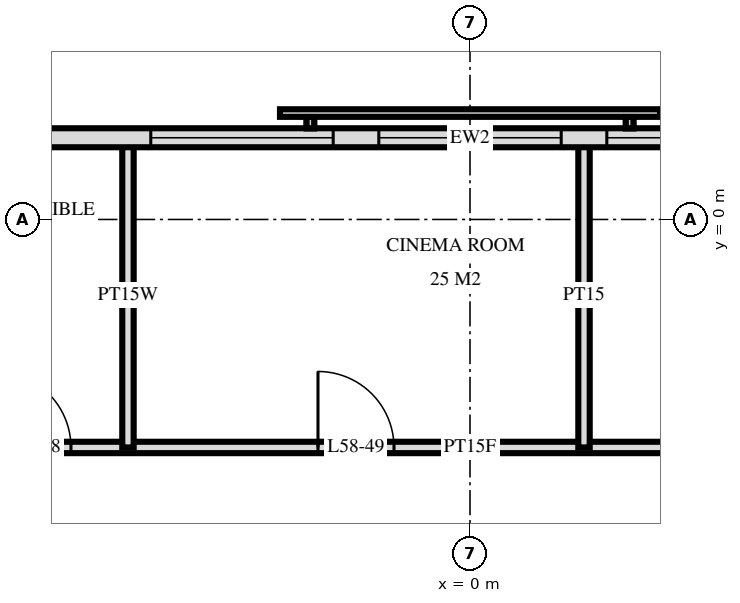
"""IFC4 building model, lengths in metres.
Left out: names, types, materials, properties, quantities, classifications, styles, units other than length and angle.
Written with IfcOpenShell. Run it as: python <this file> out.ifc"""

import sys

from ifc_helpers import new_model, si_unit, direction, frame, frame_2d, origin, place, context, subcontext, project, spatial, rectangle, extrude, element, fill, save


model = new_model("IFC4")
c1 = context("Model", 3, precision=1e-05, world=origin(), true_north=direction((0.0, 1.0)))
c2 = subcontext(c1, "Body", "Model", "MODEL_VIEW")
j1 = project(units=[si_unit("LENGTHUNIT", "METRE"), si_unit("PLANEANGLEUNIT", "RADIAN")], contexts=[c1])
p1 = place(None, origin())
s1 = spatial("IfcSite", under=j1, at=p1, CompositionType="ELEMENT")
p2 = place(p1, origin())
s2 = spatial("IfcBuilding", under=s1, at=p2, CompositionType="ELEMENT")
p3 = place(p2, frame((0.0, 0.0, 222.1)))
s3 = spatial("IfcBuildingStorey", under=s2, at=p3, CompositionType="ELEMENT", Elevation=222.1)
p4 = place(p3, frame((22.475, 1.075, 0.0), z_axis=(0.0, 0.0, 1.0), x_axis=(-1.0, 0.0, 0.0)))
e1 = element("IfcWall", 1, at=p4, inside=s3, PredefinedType="SOLIDWALL", context=c2, shape_type="SweptSolid", body=[
    extrude(rectangle(XDim=44.951, YDim=0.25, at=frame_2d((22.475, 0.0))), origin(), (0.0, 0.0, 1.0), 3.22),
])
p5 = place(p4, frame((15.275, 0.0, 0.9)))
e2 = element("IfcOpeningElement", 2, at=p5, cuts=e1, PredefinedType="OPENING", context=c2, shape_type="SweptSolid", body=[
    extrude(rectangle(XDim=2.4, YDim=1.5, at=frame_2d((1.2, 0.75))), frame((0.0, 0.135, 0.0), z_axis=(0.0, -1.0, 0.0), x_axis=(1.0, 0.0, 0.0)), (0.0, 0.0, 1.0), 0.27),
])
p6 = place(p4, frame((18.275, 0.0, 0.9)))
e3 = element("IfcOpeningElement", 3, at=p6, cuts=e1, PredefinedType="OPENING", context=c2, shape_type="SweptSolid", body=[
    extrude(rectangle(XDim=2.4, YDim=1.5, at=frame_2d((1.2, 0.75))), frame((0.0, 0.135, 0.0), z_axis=(0.0, -1.0, 0.0), x_axis=(1.0, 0.0, 0.0)), (0.0, 0.0, 1.0), 0.27),
])
p7 = place(p4, frame((21.275, 0.0, 0.9)))
e4 = element("IfcOpeningElement", 4, at=p7, cuts=e1, PredefinedType="OPENING", context=c2, shape_type="SweptSolid", body=[
    extrude(rectangle(XDim=2.4, YDim=1.5, at=frame_2d((1.2, 0.75))), frame((0.0, 0.135, 0.0), z_axis=(0.0, -1.0, 0.0), x_axis=(1.0, 0.0, 0.0)), (0.0, 0.0, 1.0), 0.27),
])
p8 = place(p4, frame((24.275, 0.0, 0.9)))
e5 = element("IfcOpeningElement", 5, at=p8, cuts=e1, PredefinedType="OPENING", context=c2, shape_type="SweptSolid", body=[
    extrude(rectangle(XDim=2.4, YDim=1.5, at=frame_2d((1.2, 0.75))), frame((0.0, 0.135, 0.0), z_axis=(0.0, -1.0, 0.0), x_axis=(1.0, 0.0, 0.0)), (0.0, 0.0, 1.0), 0.27),
])
p9 = place(p3, frame((1.5, -3.0, 0.0), z_axis=(0.0, 0.0, 1.0), x_axis=(0.0, 1.0, 0.0)))
e6 = element("IfcWall", 6, at=p9, inside=s3, PredefinedType="PARTITIONING", context=c2, shape_type="SweptSolid", body=[
    extrude(rectangle(XDim=4.02, YDim=0.15, at=frame_2d((2.01, 0.0))), origin(), (0.0, 0.0, 1.0), 3.22),
])
p10 = place(p3, frame((-4.5, -3.0, 0.0), z_axis=(0.0, 0.0, 1.0), x_axis=(0.0, 1.0, 0.0)))
e7 = element("IfcWall", 7, at=p10, inside=s3, PredefinedType="PLUMBINGWALL", context=c2, shape_type="SweptSolid", body=[
    extrude(rectangle(XDim=4.02, YDim=0.15, at=frame_2d((2.01, 0.0))), origin(), (0.0, 0.0, 1.0), 3.22),
])
p11 = place(p3, frame((-9.95, -3.0, 0.0), z_axis=(0.0, 0.0, 1.0), x_axis=(1.0, 0.0, 0.0)))
e8 = element("IfcWall", 8, at=p11, inside=s3, PredefinedType="PARTITIONING", context=c2, shape_type="SweptSolid", body=[
    extrude(rectangle(XDim=19.9, YDim=0.15, at=frame_2d((9.95, 0.0))), origin(), (0.0, 0.0, 1.0), 3.22),
])
p12 = place(p11, frame((0.95, 0.0, 0.0)))
e9 = element("IfcOpeningElement", 9, at=p12, cuts=e8, PredefinedType="OPENING", context=c2, shape_type="SweptSolid", body=[
    extrude(rectangle(XDim=1.0, YDim=2.1, at=frame_2d((0.5, 1.05))), frame((0.0, 0.085, 0.0), z_axis=(0.0, -1.0, 0.0), x_axis=(1.0, 0.0, 0.0)), (0.0, 0.0, 1.0), 0.17),
])
p13 = place(p11, frame((3.7, 0.0, 0.0)))
e10 = element("IfcOpeningElement", 10, at=p13, cuts=e8, PredefinedType="OPENING", context=c2, shape_type="SweptSolid", body=[
    extrude(rectangle(XDim=1.0, YDim=2.1, at=frame_2d((0.5, 1.05))), frame((0.0, 0.085, 0.0), z_axis=(0.0, -1.0, 0.0), x_axis=(1.0, 0.0, 0.0)), (0.0, 0.0, 1.0), 0.17),
])
p14 = place(p11, frame((7.95, 0.0, 0.0)))
e11 = element("IfcOpeningElement", 11, at=p14, cuts=e8, PredefinedType="OPENING", context=c2, shape_type="SweptSolid", body=[
    extrude(rectangle(XDim=1.0, YDim=2.1, at=frame_2d((0.5, 1.05))), frame((0.0, 0.085, 0.0), z_axis=(0.0, -1.0, 0.0), x_axis=(1.0, 0.0, 0.0)), (0.0, 0.0, 1.0), 0.17),
])
p15 = place(p11, frame((15.2, 0.0, 0.0)))
e12 = element("IfcOpeningElement", 12, at=p15, cuts=e8, PredefinedType="OPENING", context=c2, shape_type="SweptSolid", body=[
    extrude(rectangle(XDim=1.0, YDim=2.1, at=frame_2d((0.5, 1.05))), frame((0.0, 0.085, 0.0), z_axis=(0.0, -1.0, 0.0), x_axis=(1.0, 0.0, 0.0)), (0.0, 0.0, 1.0), 0.17),
])
p16 = place(p6, origin())
e13 = element("IfcWindow", 13, at=p16, inside=s3, PartitioningType="SINGLE_PANEL", PredefinedType="WINDOW", context=c2, shape_type="SweptSolid", body=[
    extrude(rectangle(XDim=2.4, YDim=1.5, at=frame_2d((1.2, 0.75))), frame((0.0, 0.03, 0.0), z_axis=(0.0, -1.0, 0.0), x_axis=(1.0, 0.0, 0.0)), (0.0, 0.0, 1.0), 0.06),
])
fill(e3, e13)
p17 = place(p7, origin())
e14 = element("IfcWindow", 14, at=p17, inside=s3, PartitioningType="SINGLE_PANEL", PredefinedType="WINDOW", context=c2, shape_type="SweptSolid", body=[
    extrude(rectangle(XDim=2.4, YDim=1.5, at=frame_2d((1.2, 0.75))), frame((0.0, 0.03, 0.0), z_axis=(0.0, -1.0, 0.0), x_axis=(1.0, 0.0, 0.0)), (0.0, 0.0, 1.0), 0.06),
])
fill(e4, e14)
p18 = place(p8, origin())
e15 = element("IfcWindow", 15, at=p18, inside=s3, PartitioningType="SINGLE_PANEL", PredefinedType="WINDOW", context=c2, shape_type="SweptSolid", body=[
    extrude(rectangle(XDim=2.4, YDim=1.5, at=frame_2d((1.2, 0.75))), frame((0.0, 0.03, 0.0), z_axis=(0.0, -1.0, 0.0), x_axis=(1.0, 0.0, 0.0)), (0.0, 0.0, 1.0), 0.06),
])
fill(e5, e15)
p19 = place(p13, origin())
e16 = element("IfcDoor", 16, at=p19, inside=s3, OperationType="SINGLE_SWING_RIGHT", PredefinedType="DOOR", context=c2, shape_type="SweptSolid", body=[
    extrude(rectangle(XDim=1.0, YDim=2.1, at=frame_2d((0.5, 1.05))), frame((0.0, 0.025, 0.0), z_axis=(0.0, -1.0, 0.0), x_axis=(1.0, 0.0, 0.0)), (0.0, 0.0, 1.0), 0.05),
])
fill(e10, e16)
p20 = place(p14, origin())
e17 = element("IfcDoor", 17, at=p20, inside=s3, OperationType="SINGLE_SWING_RIGHT", PredefinedType="DOOR", context=c2, shape_type="SweptSolid", body=[
    extrude(rectangle(XDim=1.0, YDim=2.1, at=frame_2d((0.5, 1.05))), frame((0.0, 0.025, 0.0), z_axis=(0.0, -1.0, 0.0), x_axis=(1.0, 0.0, 0.0)), (0.0, 0.0, 1.0), 0.05),
])
fill(e11, e17)
save(model, sys.argv[1])
